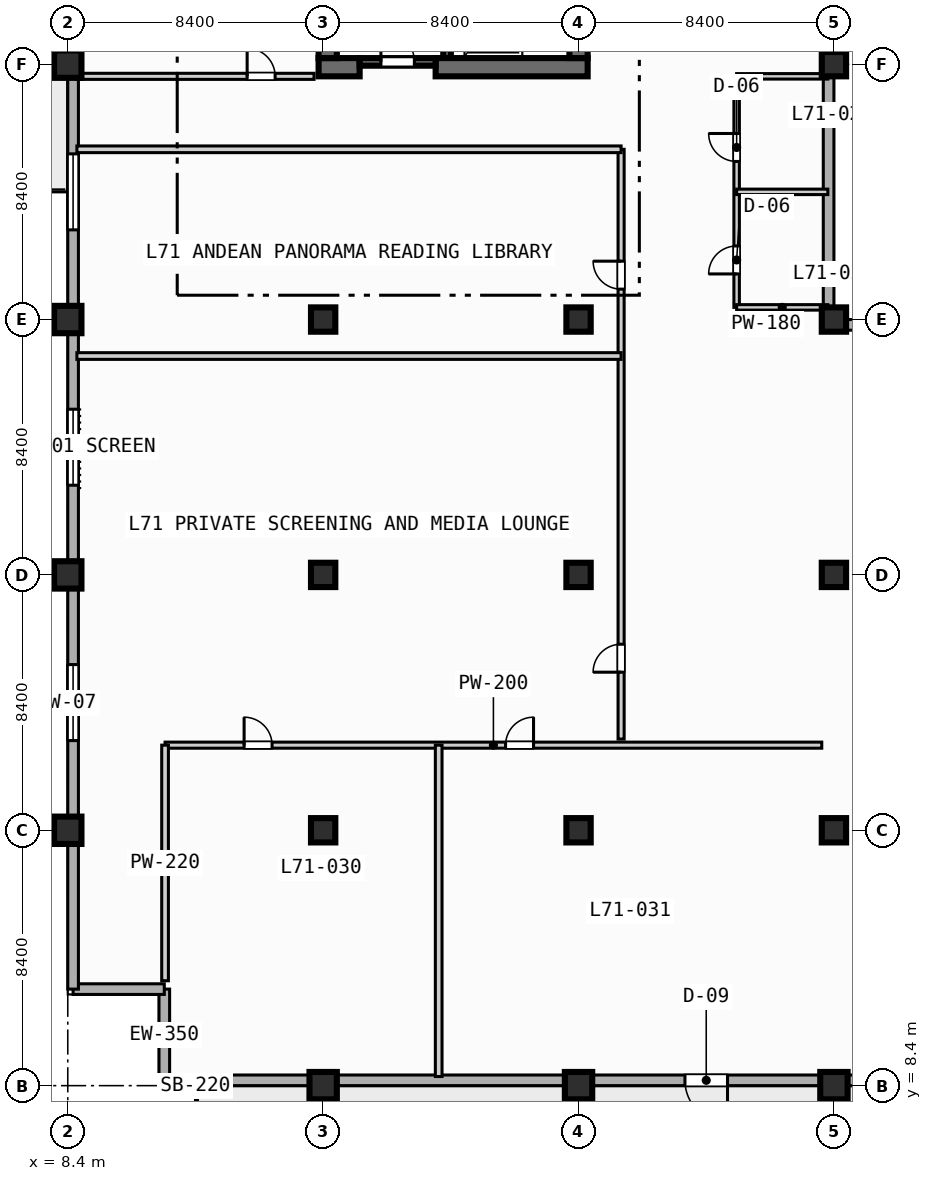
"""IFC4 building model, lengths in metres.
Left out: names, types, materials, properties, quantities, classifications, styles, units other than length and angle.
Written with IfcOpenShell. Run it as: python <this file> out.ifc"""

import sys

from ifc_helpers import new_model, si_unit, direction, frame, frame_2d, origin, origin_2d, place, context, subcontext, project, spatial, rectangle, extrude, element, fill, save


model = new_model("IFC4")
c1 = context("Model", 3, precision=1e-05, world=origin(), true_north=direction((0.0, 1.0)))
c2 = subcontext(c1, "Body", "Model", "MODEL_VIEW")
j1 = project(units=[si_unit("LENGTHUNIT", "METRE"), si_unit("PLANEANGLEUNIT", "RADIAN")], contexts=[c1])
p1 = place(None, origin())
s1 = spatial("IfcSite", under=j1, at=p1, CompositionType="ELEMENT")
p2 = place(p1, origin())
s2 = spatial("IfcBuilding", under=s1, at=p2, CompositionType="ELEMENT")
p3 = place(p2, frame((0.0, 0.0, 286.0)))
s3 = spatial("IfcBuildingStorey", under=s2, at=p3, CompositionType="ELEMENT", Elevation=286.0)
p4 = place(p3, frame((20.875, 42.2, 0.0), z_axis=(0.0, 0.0, 1.0), x_axis=(0.0, 1.0, 0.0)))
e1 = element("IfcWall", 1, at=p4, inside=s3, PredefinedType="SOLIDWALL", context=c2, shape_type="SweptSolid", body=[
    extrude(rectangle(XDim=8.05, YDim=0.25, at=frame_2d((4.025, 0.0))), origin(), (0.0, 0.0, 1.0), 4.17),
])
p5 = place(p3, frame((16.65, 41.9, 0.0), z_axis=(0.0, 0.0, 1.0), x_axis=(1.0, 0.0, 0.0)))
e2 = element("IfcWall", 2, at=p5, inside=s3, PredefinedType="SHEAR", context=c2, shape_type="SweptSolid", body=[
    extrude(rectangle(XDim=1.35, YDim=0.6, at=frame_2d((0.675, 0.0))), origin(), (0.0, 0.0, 1.0), 4.17),
])
p6 = place(p3, frame((20.5, 41.9, 0.0), z_axis=(0.0, 0.0, 1.0), x_axis=(1.0, 0.0, 0.0)))
e3 = element("IfcWall", 3, at=p6, inside=s3, PredefinedType="SHEAR", context=c2, shape_type="SweptSolid", body=[
    extrude(rectangle(XDim=5.0, YDim=0.6, at=frame_2d((2.5, 0.0))), origin(), (0.0, 0.0, 1.0), 4.17),
])
p7 = place(p3, frame((16.95, 42.2, 0.0), z_axis=(0.0, 0.0, 1.0), x_axis=(0.0, 1.0, 0.0)))
e4 = element("IfcWall", 4, at=p7, inside=s3, PredefinedType="SHEAR", context=c2, shape_type="SweptSolid", body=[
    extrude(rectangle(XDim=16.35, YDim=0.6, at=frame_2d((8.175, 0.0))), origin(), (0.0, 0.0, 1.0), 4.17),
])
p8 = place(p3, frame((25.2, 42.2, 0.0), z_axis=(0.0, 0.0, 1.0), x_axis=(0.0, 1.0, 0.0)))
e5 = element("IfcWall", 5, at=p8, inside=s3, PredefinedType="SHEAR", context=c2, shape_type="SweptSolid", body=[
    extrude(rectangle(XDim=8.6, YDim=0.6, at=frame_2d((4.3, 0.0))), origin(), (0.0, 0.0, 1.0), 4.17),
])
for number, where, z_axis, x_axis in (
    (6, (8.4, 16.8, 0.0), (0.0, 0.0, 1.0), (1.0, 0.0, 0.0)),
    (7, (8.4, 25.2, 0.0), (0.0, 0.0, 1.0), (1.0, 0.0, 0.0)),
    (8, (8.4, 33.6, 0.0), (0.0, 0.0, 1.0), (1.0, 0.0, 0.0)),
    (9, (8.4, 42.0, 0.0), (0.0, 0.0, 1.0), (1.0, 0.0, 0.0)),
    (10, (16.8, 8.4, 0.0), (0.0, 0.0, 1.0), (1.0, 0.0, 0.0)),
):
    element("IfcColumn", number, at=place(p3, frame(where, z_axis=z_axis, x_axis=x_axis)), inside=s3, PredefinedType="COLUMN", context=c2, shape_type="SweptSolid", body=[
        extrude(rectangle(XDim=0.9, YDim=0.9, at=origin_2d()), origin(), (0.0, 0.0, 1.0), 4.4),
    ])
for number, where, z_axis, x_axis in (
    (11, (16.8, 16.8, 0.0), (0.0, 0.0, 1.0), (1.0, 0.0, 0.0)),
    (12, (16.8, 25.2, 0.0), (0.0, 0.0, 1.0), (1.0, 0.0, 0.0)),
    (13, (16.8, 33.6, 0.0), (0.0, 0.0, 1.0), (1.0, 0.0, 0.0)),
):
    element("IfcColumn", number, at=place(p3, frame(where, z_axis=z_axis, x_axis=x_axis)), inside=s3, PredefinedType="COLUMN", context=c2, shape_type="SweptSolid", body=[
        extrude(rectangle(XDim=0.8, YDim=0.8, at=origin_2d()), origin(), (0.0, 0.0, 1.0), 4.4),
    ])
p9 = place(p3, frame((25.2, 8.4, 0.0), z_axis=(0.0, 0.0, 1.0), x_axis=(1.0, 0.0, 0.0)))
e14 = element("IfcColumn", 14, at=p9, inside=s3, PredefinedType="COLUMN", context=c2, shape_type="SweptSolid", body=[
    extrude(rectangle(XDim=0.9, YDim=0.9, at=origin_2d()), origin(), (0.0, 0.0, 1.0), 4.4),
])
for number, where, z_axis, x_axis in (
    (15, (25.2, 16.8, 0.0), (0.0, 0.0, 1.0), (1.0, 0.0, 0.0)),
    (16, (25.2, 25.2, 0.0), (0.0, 0.0, 1.0), (1.0, 0.0, 0.0)),
    (17, (25.2, 33.6, 0.0), (0.0, 0.0, 1.0), (1.0, 0.0, 0.0)),
):
    element("IfcColumn", number, at=place(p3, frame(where, z_axis=z_axis, x_axis=x_axis)), inside=s3, PredefinedType="COLUMN", context=c2, shape_type="SweptSolid", body=[
        extrude(rectangle(XDim=0.8, YDim=0.8, at=origin_2d()), origin(), (0.0, 0.0, 1.0), 4.4),
    ])
p10 = place(p3, frame((33.6, 8.4, 0.0), z_axis=(0.0, 0.0, 1.0), x_axis=(1.0, 0.0, 0.0)))
e18 = element("IfcColumn", 18, at=p10, inside=s3, PredefinedType="COLUMN", context=c2, shape_type="SweptSolid", body=[
    extrude(rectangle(XDim=0.9, YDim=0.9, at=origin_2d()), origin(), (0.0, 0.0, 1.0), 4.4),
])
for number, where, z_axis, x_axis in (
    (19, (33.6, 16.8, 0.0), (0.0, 0.0, 1.0), (1.0, 0.0, 0.0)),
    (20, (33.6, 25.2, 0.0), (0.0, 0.0, 1.0), (1.0, 0.0, 0.0)),
    (21, (33.6, 33.6, 0.0), (0.0, 0.0, 1.0), (1.0, 0.0, 0.0)),
    (22, (33.6, 42.0, 0.0), (0.0, 0.0, 1.0), (1.0, 0.0, 0.0)),
):
    element("IfcColumn", number, at=place(p3, frame(where, z_axis=z_axis, x_axis=x_axis)), inside=s3, PredefinedType="COLUMN", context=c2, shape_type="SweptSolid", body=[
        extrude(rectangle(XDim=0.8, YDim=0.8, at=origin_2d()), origin(), (0.0, 0.0, 1.0), 4.4),
    ])
for number, where, z_axis, x_axis in (
    (23, (11.575, 8.575, 0.0), (0.0, 0.0, 1.0), (0.0, 1.0, 0.0)),
    (24, (11.575, 11.575, 0.0), (0.0, 0.0, 1.0), (-1.0, 0.0, 0.0)),
):
    element("IfcWall", number, at=place(p3, frame(where, z_axis=z_axis, x_axis=x_axis)), inside=s3, PredefinedType="STANDARD", context=c2, shape_type="SweptSolid", body=[
        extrude(rectangle(XDim=3.0, YDim=0.35, at=frame_2d((1.5, 0.0))), origin(), (0.0, 0.0, 1.0), 4.17),
    ])
p11 = place(p3, frame((8.575, 11.575, 0.0), z_axis=(0.0, 0.0, 1.0), x_axis=(0.0, 1.0, 0.0)))
e25 = element("IfcWall", 25, at=p11, inside=s3, PredefinedType="STANDARD", context=c2, shape_type="SweptSolid", body=[
    extrude(rectangle(XDim=60.85, YDim=0.35, at=frame_2d((30.425, 0.0))), origin(), (0.0, 0.0, 1.0), 4.17),
])
p12 = place(p11, frame((33.925, 0.0, 0.0)))
e26 = element("IfcOpeningElement", 26, at=p12, cuts=e25, PredefinedType="OPENING", context=c2, shape_type="SweptSolid", body=[
    extrude(rectangle(XDim=1.4, YDim=2.2, at=frame_2d((0.7, 1.1))), frame((0.0, 0.185, 0.0), z_axis=(0.0, -1.0, 0.0), x_axis=(1.0, 0.0, 0.0)), (0.0, 0.0, 1.0), 0.37),
])
p13 = place(p11, frame((8.175, 0.0, 0.85)))
e27 = element("IfcOpeningElement", 27, at=p13, cuts=e25, PredefinedType="OPENING", context=c2, shape_type="SweptSolid", body=[
    extrude(rectangle(XDim=2.5, YDim=2.2, at=frame_2d((1.25, 1.1))), frame((0.0, 0.185, 0.0), z_axis=(0.0, -1.0, 0.0), x_axis=(1.0, 0.0, 0.0)), (0.0, 0.0, 1.0), 0.37),
])
p14 = place(p11, frame((16.575, 0.0, 0.85)))
e28 = element("IfcOpeningElement", 28, at=p14, cuts=e25, PredefinedType="OPENING", context=c2, shape_type="SweptSolid", body=[
    extrude(rectangle(XDim=2.5, YDim=2.2, at=frame_2d((1.25, 1.1))), frame((0.0, 0.185, 0.0), z_axis=(0.0, -1.0, 0.0), x_axis=(1.0, 0.0, 0.0)), (0.0, 0.0, 1.0), 0.37),
])
p15 = place(p11, frame((24.975, 0.0, 0.85)))
e29 = element("IfcOpeningElement", 29, at=p15, cuts=e25, PredefinedType="OPENING", context=c2, shape_type="SweptSolid", body=[
    extrude(rectangle(XDim=2.5, YDim=2.2, at=frame_2d((1.25, 1.1))), frame((0.0, 0.185, 0.0), z_axis=(0.0, -1.0, 0.0), x_axis=(1.0, 0.0, 0.0)), (0.0, 0.0, 1.0), 0.37),
])
p16 = place(p11, frame((41.775, 0.0, 0.85)))
e30 = element("IfcOpeningElement", 30, at=p16, cuts=e25, PredefinedType="OPENING", context=c2, shape_type="SweptSolid", body=[
    extrude(rectangle(XDim=2.5, YDim=2.2, at=frame_2d((1.25, 1.1))), frame((0.0, 0.185, 0.0), z_axis=(0.0, -1.0, 0.0), x_axis=(1.0, 0.0, 0.0)), (0.0, 0.0, 1.0), 0.37),
])
p17 = place(p3, frame((33.425, 72.425, 0.0), z_axis=(0.0, 0.0, 1.0), x_axis=(0.0, -1.0, 0.0)))
e31 = element("IfcWall", 31, at=p17, inside=s3, PredefinedType="STANDARD", context=c2, shape_type="SweptSolid", body=[
    extrude(rectangle(XDim=39.0, YDim=0.35, at=frame_2d((19.5, 0.0))), origin(), (0.0, 0.0, 1.0), 4.17),
])
p18 = place(p3, frame((33.425, 33.425, 0.0), z_axis=(0.0, 0.0, 1.0), x_axis=(1.0, 0.0, 0.0)))
e32 = element("IfcWall", 32, at=p18, inside=s3, PredefinedType="STANDARD", context=c2, shape_type="SweptSolid", body=[
    extrude(rectangle(XDim=30.6, YDim=0.35, at=frame_2d((15.3, 0.0))), origin(), (0.0, 0.0, 1.0), 4.17),
])
p19 = place(p18, frame((12.075, 0.0, 0.0)))
e33 = element("IfcOpeningElement", 33, at=p19, cuts=e32, PredefinedType="OPENING", context=c2, shape_type="SweptSolid", body=[
    extrude(rectangle(XDim=1.4, YDim=2.2, at=frame_2d((0.7, 1.1))), frame((0.0, 0.185, 0.0), z_axis=(0.0, -1.0, 0.0), x_axis=(1.0, 0.0, 0.0)), (0.0, 0.0, 1.0), 0.37),
])
p20 = place(p3, frame((64.025, 8.575, 0.0), z_axis=(0.0, 0.0, 1.0), x_axis=(-1.0, 0.0, 0.0)))
e34 = element("IfcWall", 34, at=p20, inside=s3, PredefinedType="STANDARD", context=c2, shape_type="SweptSolid", body=[
    extrude(rectangle(XDim=52.45, YDim=0.35, at=frame_2d((26.225, 0.0))), origin(), (0.0, 0.0, 1.0), 4.17),
])
p21 = place(p20, frame((33.925, 0.0, 0.0)))
e35 = element("IfcOpeningElement", 35, at=p21, cuts=e34, PredefinedType="OPENING", context=c2, shape_type="SweptSolid", body=[
    extrude(rectangle(XDim=1.4, YDim=2.2, at=frame_2d((0.7, 1.1))), frame((0.0, 0.185, 0.0), z_axis=(0.0, -1.0, 0.0), x_axis=(1.0, 0.0, 0.0)), (0.0, 0.0, 1.0), 0.37),
])
p22 = place(p20, frame((16.575, 0.0, 0.85)))
e36 = element("IfcOpeningElement", 36, at=p22, cuts=e34, PredefinedType="OPENING", context=c2, shape_type="SweptSolid", body=[
    extrude(rectangle(XDim=2.5, YDim=2.2, at=frame_2d((1.25, 1.1))), frame((0.0, 0.185, 0.0), z_axis=(0.0, -1.0, 0.0), x_axis=(1.0, 0.0, 0.0)), (0.0, 0.0, 1.0), 0.37),
])
p23 = place(p20, frame((8.175, 0.0, 0.85)))
e37 = element("IfcOpeningElement", 37, at=p23, cuts=e34, PredefinedType="OPENING", context=c2, shape_type="SweptSolid", body=[
    extrude(rectangle(XDim=2.5, YDim=2.2, at=frame_2d((1.25, 1.1))), frame((0.0, 0.185, 0.0), z_axis=(0.0, -1.0, 0.0), x_axis=(1.0, 0.0, 0.0)), (0.0, 0.0, 1.0), 0.37),
])
p24 = place(p3, frame((18.0, 42.075, 0.0), z_axis=(0.0, 0.0, 1.0), x_axis=(1.0, 0.0, 0.0)))
e38 = element("IfcWall", 38, at=p24, inside=s3, PredefinedType="SOLIDWALL", context=c2, shape_type="SweptSolid", body=[
    extrude(rectangle(XDim=2.5, YDim=0.25, at=frame_2d((1.25, 0.0))), origin(), (0.0, 0.0, 1.0), 4.17),
])
p25 = place(p24, frame((0.7, 0.0, 0.0)))
e39 = element("IfcOpeningElement", 39, at=p25, cuts=e38, PredefinedType="OPENING", context=c2, shape_type="SweptSolid", body=[
    extrude(rectangle(XDim=1.1, YDim=2.15, at=frame_2d((0.55, 1.075))), frame((0.0, 0.135, 0.0), z_axis=(0.0, -1.0, 0.0), x_axis=(1.0, 0.0, 0.0)), (0.0, 0.0, 1.0), 0.27),
])
p26 = place(p3, frame((30.4, 34.0, 0.0), z_axis=(0.0, 0.0, 1.0), x_axis=(0.0, 1.0, 0.0)))
e40 = element("IfcWall", 40, at=p26, inside=s3, PredefinedType="PLUMBINGWALL", context=c2, shape_type="SweptSolid", body=[
    extrude(rectangle(XDim=7.6, YDim=0.18, at=frame_2d((3.8, 0.0))), origin(), (0.0, 0.0, 1.0), 4.17),
])
p27 = place(p26, frame((1.1, 0.0, 0.0)))
e41 = element("IfcOpeningElement", 41, at=p27, cuts=e40, PredefinedType="OPENING", context=c2, shape_type="SweptSolid", body=[
    extrude(rectangle(XDim=0.92, YDim=2.1, at=frame_2d((0.46, 1.05))), frame((0.0, 0.1, 0.0), z_axis=(0.0, -1.0, 0.0), x_axis=(1.0, 0.0, 0.0)), (0.0, 0.0, 1.0), 0.2),
])
p28 = place(p26, frame((4.8, 0.0, 0.0)))
e42 = element("IfcOpeningElement", 42, at=p28, cuts=e40, PredefinedType="OPENING", context=c2, shape_type="SweptSolid", body=[
    extrude(rectangle(XDim=0.92, YDim=2.1, at=frame_2d((0.46, 1.05))), frame((0.0, 0.1, 0.0), z_axis=(0.0, -1.0, 0.0), x_axis=(1.0, 0.0, 0.0)), (0.0, 0.0, 1.0), 0.2),
])
for number, where, z_axis, x_axis in (
    (43, (30.4, 34.0, 0.0), (0.0, 0.0, 1.0), (1.0, 0.0, 0.0)),
    (44, (30.4, 37.8, 0.0), (0.0, 0.0, 1.0), (1.0, 0.0, 0.0)),
    (45, (30.4, 41.6, 0.0), (0.0, 0.0, 1.0), (1.0, 0.0, 0.0)),
):
    element("IfcWall", number, at=place(p3, frame(where, z_axis=z_axis, x_axis=x_axis)), inside=s3, PredefinedType="PLUMBINGWALL", context=c2, shape_type="SweptSolid", body=[
        extrude(rectangle(XDim=3.0, YDim=0.18, at=frame_2d((1.5, 0.0))), origin(), (0.0, 0.0, 1.0), 4.17),
    ])
p29 = place(p3, frame((8.7, 41.6, 0.0), z_axis=(0.0, 0.0, 1.0), x_axis=(1.0, 0.0, 0.0)))
e46 = element("IfcWall", 46, at=p29, inside=s3, PredefinedType="PARTITIONING", context=c2, shape_type="SweptSolid", body=[
    extrude(rectangle(XDim=7.8, YDim=0.2, at=frame_2d((3.9, 0.0))), origin(), (0.0, 0.0, 1.0), 4.17),
])
p30 = place(p29, frame((5.6, 0.0, 0.0)))
e47 = element("IfcOpeningElement", 47, at=p30, cuts=e46, PredefinedType="OPENING", context=c2, shape_type="SweptSolid", body=[
    extrude(rectangle(XDim=0.92, YDim=2.1, at=frame_2d((0.46, 1.05))), frame((0.0, 0.11, 0.0), z_axis=(0.0, -1.0, 0.0), x_axis=(1.0, 0.0, 0.0)), (0.0, 0.0, 1.0), 0.22),
])
p31 = place(p3, frame((11.6, 19.6, 0.0), z_axis=(0.0, 0.0, 1.0), x_axis=(1.0, 0.0, 0.0)))
e48 = element("IfcWall", 48, at=p31, inside=s3, PredefinedType="PARTITIONING", context=c2, shape_type="SweptSolid", body=[
    extrude(rectangle(XDim=21.6, YDim=0.2, at=frame_2d((10.8, 0.0))), origin(), (0.0, 0.0, 1.0), 4.17),
])
p32 = place(p31, frame((2.6, 0.0, 0.0)))
e49 = element("IfcOpeningElement", 49, at=p32, cuts=e48, PredefinedType="OPENING", context=c2, shape_type="SweptSolid", body=[
    extrude(rectangle(XDim=0.92, YDim=2.1, at=frame_2d((0.46, 1.05))), frame((0.0, 0.11, 0.0), z_axis=(0.0, -1.0, 0.0), x_axis=(1.0, 0.0, 0.0)), (0.0, 0.0, 1.0), 0.22),
])
p33 = place(p31, frame((11.2, 0.0, 0.0)))
e50 = element("IfcOpeningElement", 50, at=p33, cuts=e48, PredefinedType="OPENING", context=c2, shape_type="SweptSolid", body=[
    extrude(rectangle(XDim=0.92, YDim=2.1, at=frame_2d((0.46, 1.05))), frame((0.0, 0.11, 0.0), z_axis=(0.0, -1.0, 0.0), x_axis=(1.0, 0.0, 0.0)), (0.0, 0.0, 1.0), 0.22),
])
p34 = place(p3, frame((11.6, 11.85, 0.0), z_axis=(0.0, 0.0, 1.0), x_axis=(0.0, 1.0, 0.0)))
e51 = element("IfcWall", 51, at=p34, inside=s3, PredefinedType="PARTITIONING", context=c2, shape_type="SweptSolid", body=[
    extrude(rectangle(XDim=7.75, YDim=0.22, at=frame_2d((3.875, 0.0))), origin(), (0.0, 0.0, 1.0), 4.17),
])
p35 = place(p3, frame((20.6, 8.7, 0.0), z_axis=(0.0, 0.0, 1.0), x_axis=(0.0, 1.0, 0.0)))
e52 = element("IfcWall", 52, at=p35, inside=s3, PredefinedType="PARTITIONING", context=c2, shape_type="SweptSolid", body=[
    extrude(rectangle(XDim=10.9, YDim=0.22, at=frame_2d((5.45, 0.0))), origin(), (0.0, 0.0, 1.0), 4.17),
])
p36 = place(p3, frame((26.6, 19.8, 0.0), z_axis=(0.0, 0.0, 1.0), x_axis=(0.0, 1.0, 0.0)))
e53 = element("IfcWall", 53, at=p36, inside=s3, PredefinedType="PARTITIONING", context=c2, shape_type="SweptSolid", body=[
    extrude(rectangle(XDim=19.4, YDim=0.2, at=frame_2d((9.7, 0.0))), origin(), (0.0, 0.0, 1.0), 4.17),
])
p37 = place(p36, frame((2.2, 0.0, 0.0)))
e54 = element("IfcOpeningElement", 54, at=p37, cuts=e53, PredefinedType="OPENING", context=c2, shape_type="SweptSolid", body=[
    extrude(rectangle(XDim=0.92, YDim=2.1, at=frame_2d((0.46, 1.05))), frame((0.0, 0.11, 0.0), z_axis=(0.0, -1.0, 0.0), x_axis=(1.0, 0.0, 0.0)), (0.0, 0.0, 1.0), 0.22),
])
p38 = place(p36, frame((14.8, 0.0, 0.0)))
e55 = element("IfcOpeningElement", 55, at=p38, cuts=e53, PredefinedType="OPENING", context=c2, shape_type="SweptSolid", body=[
    extrude(rectangle(XDim=0.92, YDim=2.1, at=frame_2d((0.46, 1.05))), frame((0.0, 0.11, 0.0), z_axis=(0.0, -1.0, 0.0), x_axis=(1.0, 0.0, 0.0)), (0.0, 0.0, 1.0), 0.22),
])
for number, where, z_axis, x_axis in (
    (56, (8.7, 32.4, 0.0), (0.0, 0.0, 1.0), (1.0, 0.0, 0.0)),
    (57, (8.7, 39.2, 0.0), (0.0, 0.0, 1.0), (1.0, 0.0, 0.0)),
):
    element("IfcWall", number, at=place(p3, frame(where, z_axis=z_axis, x_axis=x_axis)), inside=s3, PredefinedType="PARTITIONING", context=c2, shape_type="SweptSolid", body=[
        extrude(rectangle(XDim=17.9, YDim=0.22, at=frame_2d((8.95, 0.0))), origin(), (0.0, 0.0, 1.0), 4.17),
    ])
p39 = place(p13, origin())
e58 = element("IfcWindow", 58, at=p39, inside=s3, PartitioningType="SINGLE_PANEL", PredefinedType="WINDOW", context=c2, shape_type="SweptSolid", body=[
    extrude(rectangle(XDim=2.5, YDim=2.2, at=frame_2d((1.25, 1.1))), frame((0.0, 0.03, 0.0), z_axis=(0.0, -1.0, 0.0), x_axis=(1.0, 0.0, 0.0)), (0.0, 0.0, 1.0), 0.06),
])
fill(e27, e58)
p40 = place(p14, origin())
e59 = element("IfcWindow", 59, at=p40, inside=s3, PartitioningType="SINGLE_PANEL", PredefinedType="WINDOW", context=c2, shape_type="SweptSolid", body=[
    extrude(rectangle(XDim=2.5, YDim=2.2, at=frame_2d((1.25, 1.1))), frame((0.0, 0.03, 0.0), z_axis=(0.0, -1.0, 0.0), x_axis=(1.0, 0.0, 0.0)), (0.0, 0.0, 1.0), 0.06),
])
fill(e28, e59)
p41 = place(p15, origin())
e60 = element("IfcWindow", 60, at=p41, inside=s3, PartitioningType="SINGLE_PANEL", PredefinedType="WINDOW", context=c2, shape_type="SweptSolid", body=[
    extrude(rectangle(XDim=2.5, YDim=2.2, at=frame_2d((1.25, 1.1))), frame((0.0, 0.03, 0.0), z_axis=(0.0, -1.0, 0.0), x_axis=(1.0, 0.0, 0.0)), (0.0, 0.0, 1.0), 0.06),
])
fill(e29, e60)
p42 = place(p21, origin())
e61 = element("IfcDoor", 61, at=p42, inside=s3, OperationType="SINGLE_SWING_LEFT", PredefinedType="DOOR", context=c2, shape_type="SweptSolid", body=[
    extrude(rectangle(XDim=1.4, YDim=2.2, at=frame_2d((0.7, 1.1))), frame((0.0, 0.025, 0.0), z_axis=(0.0, -1.0, 0.0), x_axis=(1.0, 0.0, 0.0)), (0.0, 0.0, 1.0), 0.05),
])
fill(e35, e61)
p43 = place(p25, origin())
e62 = element("IfcDoor", 62, at=p43, inside=s3, OperationType="SINGLE_SWING_LEFT", PredefinedType="DOOR", context=c2, shape_type="SweptSolid", body=[
    extrude(rectangle(XDim=1.1, YDim=2.15, at=frame_2d((0.55, 1.075))), frame((0.0, 0.025, 0.0), z_axis=(0.0, -1.0, 0.0), x_axis=(1.0, 0.0, 0.0)), (0.0, 0.0, 1.0), 0.05),
])
fill(e39, e62)
p44 = place(p27, origin())
e63 = element("IfcDoor", 63, at=p44, inside=s3, OperationType="SINGLE_SWING_LEFT", PredefinedType="DOOR", context=c2, shape_type="SweptSolid", body=[
    extrude(rectangle(XDim=0.92, YDim=2.1, at=frame_2d((0.46, 1.05))), frame((0.0, 0.025, 0.0), z_axis=(0.0, -1.0, 0.0), x_axis=(1.0, 0.0, 0.0)), (0.0, 0.0, 1.0), 0.05),
])
fill(e41, e63)
p45 = place(p28, origin())
e64 = element("IfcDoor", 64, at=p45, inside=s3, OperationType="SINGLE_SWING_RIGHT", PredefinedType="DOOR", context=c2, shape_type="SweptSolid", body=[
    extrude(rectangle(XDim=0.92, YDim=2.1, at=frame_2d((0.46, 1.05))), frame((0.0, 0.025, 0.0), z_axis=(0.0, -1.0, 0.0), x_axis=(1.0, 0.0, 0.0)), (0.0, 0.0, 1.0), 0.05),
])
fill(e42, e64)
p46 = place(p30, origin())
e65 = element("IfcDoor", 65, at=p46, inside=s3, OperationType="SINGLE_SWING_LEFT", PredefinedType="DOOR", context=c2, shape_type="SweptSolid", body=[
    extrude(rectangle(XDim=0.92, YDim=2.1, at=frame_2d((0.46, 1.05))), frame((0.0, 0.025, 0.0), z_axis=(0.0, -1.0, 0.0), x_axis=(1.0, 0.0, 0.0)), (0.0, 0.0, 1.0), 0.05),
])
fill(e47, e65)
p47 = place(p32, origin())
e66 = element("IfcDoor", 66, at=p47, inside=s3, OperationType="SINGLE_SWING_LEFT", PredefinedType="DOOR", context=c2, shape_type="SweptSolid", body=[
    extrude(rectangle(XDim=0.92, YDim=2.1, at=frame_2d((0.46, 1.05))), frame((0.0, 0.025, 0.0), z_axis=(0.0, -1.0, 0.0), x_axis=(1.0, 0.0, 0.0)), (0.0, 0.0, 1.0), 0.05),
])
fill(e49, e66)
p48 = place(p33, origin())
e67 = element("IfcDoor", 67, at=p48, inside=s3, OperationType="SINGLE_SWING_RIGHT", PredefinedType="DOOR", context=c2, shape_type="SweptSolid", body=[
    extrude(rectangle(XDim=0.92, YDim=2.1, at=frame_2d((0.46, 1.05))), frame((0.0, 0.025, 0.0), z_axis=(0.0, -1.0, 0.0), x_axis=(1.0, 0.0, 0.0)), (0.0, 0.0, 1.0), 0.05),
])
fill(e50, e67)
p49 = place(p37, origin())
e68 = element("IfcDoor", 68, at=p49, inside=s3, OperationType="SINGLE_SWING_LEFT", PredefinedType="DOOR", context=c2, shape_type="SweptSolid", body=[
    extrude(rectangle(XDim=0.92, YDim=2.1, at=frame_2d((0.46, 1.05))), frame((0.0, 0.025, 0.0), z_axis=(0.0, -1.0, 0.0), x_axis=(1.0, 0.0, 0.0)), (0.0, 0.0, 1.0), 0.05),
])
fill(e54, e68)
p50 = place(p38, origin())
e69 = element("IfcDoor", 69, at=p50, inside=s3, OperationType="SINGLE_SWING_RIGHT", PredefinedType="DOOR", context=c2, shape_type="SweptSolid", body=[
    extrude(rectangle(XDim=0.92, YDim=2.1, at=frame_2d((0.46, 1.05))), frame((0.0, 0.025, 0.0), z_axis=(0.0, -1.0, 0.0), x_axis=(1.0, 0.0, 0.0)), (0.0, 0.0, 1.0), 0.05),
])
fill(e55, e69)
save(model, sys.argv[1])
